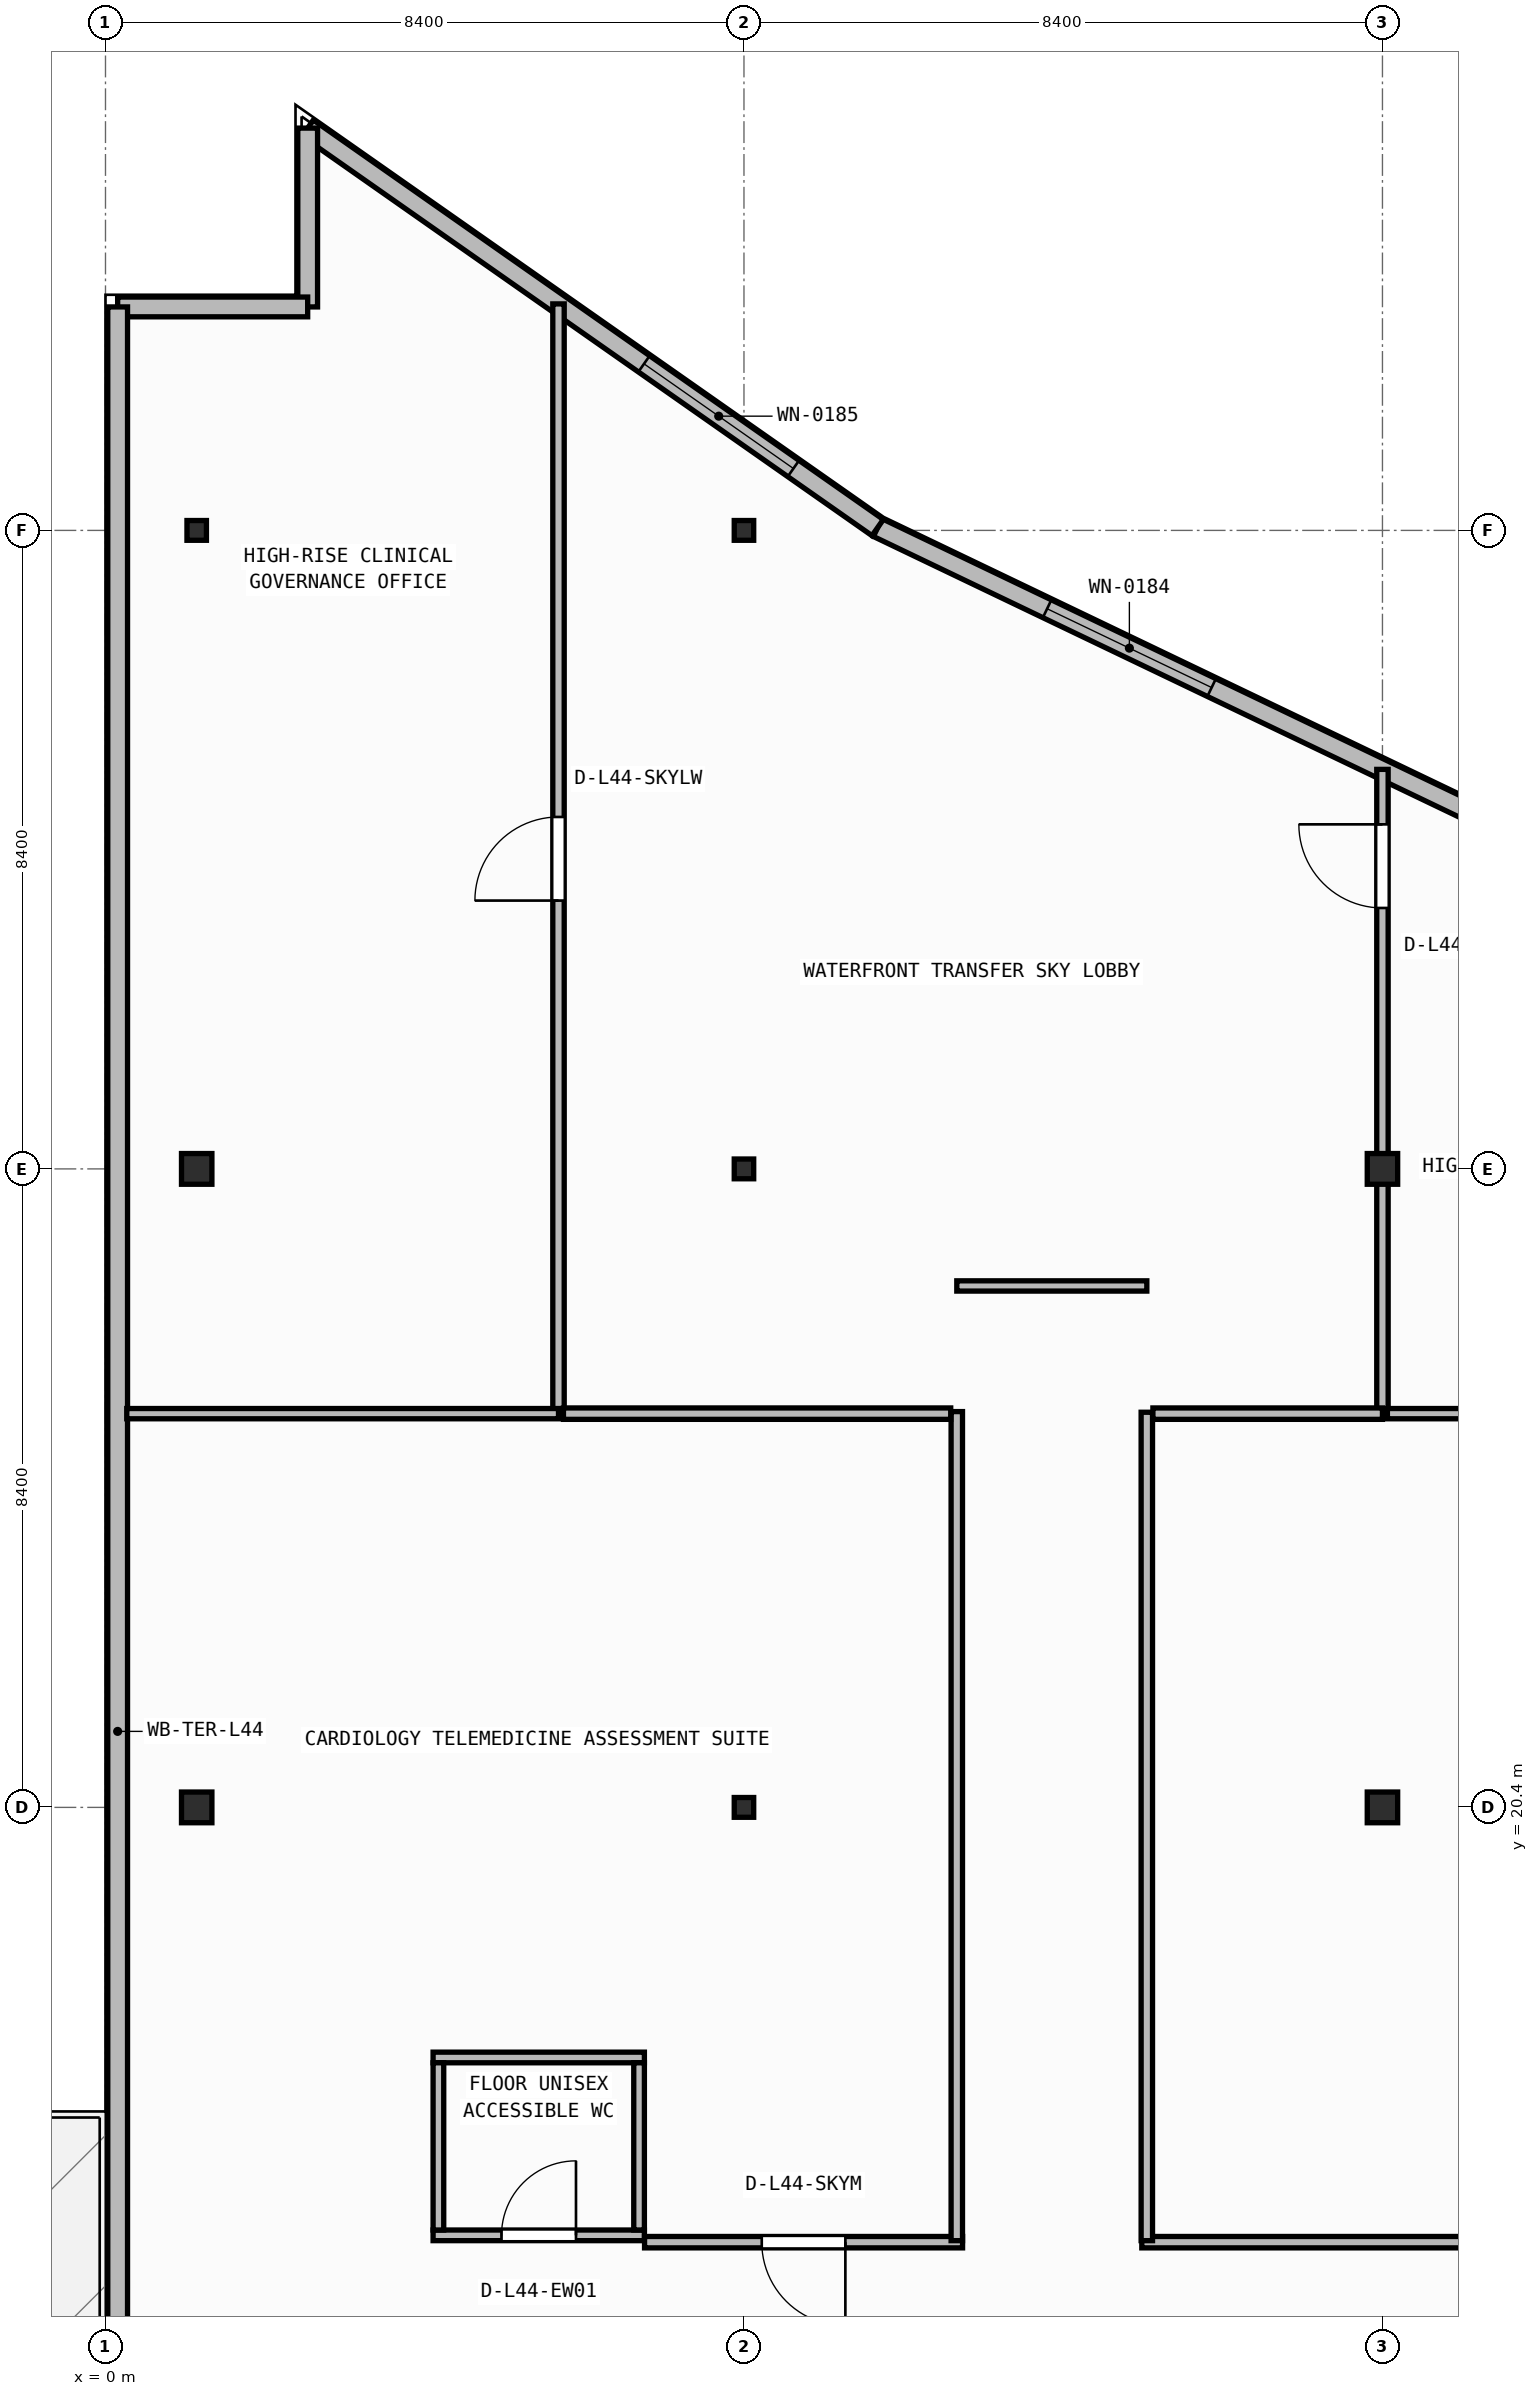
"""IFC4 building model, lengths in metres.
Left out: names, types, materials, properties, quantities, classifications, styles, units other than length and angle.
Written with IfcOpenShell. Run it as: python <this file> out.ifc"""

import sys

from ifc_helpers import new_model, si_unit, direction, frame, frame_2d, origin, origin_2d, place, context, subcontext, project, spatial, rectangle, i_section, extrude, element, fill, save


model = new_model("IFC4")
c1 = context("Model", 3, precision=1e-05, world=origin(), true_north=direction((0.0, 1.0)))
c2 = subcontext(c1, "Body", "Model", "MODEL_VIEW")
j1 = project(units=[si_unit("LENGTHUNIT", "METRE"), si_unit("PLANEANGLEUNIT", "RADIAN")], contexts=[c1])
p1 = place(None, origin())
s1 = spatial("IfcSite", under=j1, at=p1, CompositionType="ELEMENT")
p2 = place(p1, origin())
s2 = spatial("IfcBuilding", under=s1, at=p2, CompositionType="ELEMENT")
p3 = place(p2, frame((0.0, 0.0, 180.25)))
s3 = spatial("IfcBuildingStorey", under=s2, at=p3, CompositionType="ELEMENT", Elevation=180.25)
p4 = place(p3, frame((1.2, 20.4, 0.0), z_axis=(0.0, 0.0, 1.0), x_axis=(1.0, 0.0, 0.0)))
e1 = element("IfcColumn", 1, at=p4, inside=s3, PredefinedType="COLUMN", context=c2, shape_type="SweptSolid", body=[
    extrude(i_section(OverallWidth=0.4, OverallDepth=0.404, WebThickness=0.02, FlangeThickness=0.032, at=origin_2d()), origin(), (0.0, 0.0, 1.0), 3.95),
])
p5 = place(p3, frame((8.4, 20.4, 0.0), z_axis=(0.0, 0.0, 1.0), x_axis=(1.0, 0.0, 0.0)))
e2 = element("IfcColumn", 2, at=p5, inside=s3, PredefinedType="COLUMN", context=c2, shape_type="SweptSolid", body=[
    extrude(i_section(OverallWidth=0.256, OverallDepth=0.26, WebThickness=0.01, FlangeThickness=0.017, FilletRadius=0.013, at=origin_2d()), origin(), (0.0, 0.0, 1.0), 3.95),
])
for number, where, z_axis, x_axis in (
    (3, (16.8, 20.4, 0.0), (0.0, 0.0, 1.0), (1.0, 0.0, 0.0)),
    (4, (1.2, 28.8, 0.0), (0.0, 0.0, 1.0), (1.0, 0.0, 0.0)),
):
    element("IfcColumn", number, at=place(p3, frame(where, z_axis=z_axis, x_axis=x_axis)), inside=s3, PredefinedType="COLUMN", context=c2, shape_type="SweptSolid", body=[
        extrude(i_section(OverallWidth=0.4, OverallDepth=0.404, WebThickness=0.02, FlangeThickness=0.032, at=origin_2d()), origin(), (0.0, 0.0, 1.0), 3.95),
    ])
p6 = place(p3, frame((8.4, 28.8, 0.0), z_axis=(0.0, 0.0, 1.0), x_axis=(1.0, 0.0, 0.0)))
e5 = element("IfcColumn", 5, at=p6, inside=s3, PredefinedType="COLUMN", context=c2, shape_type="SweptSolid", body=[
    extrude(i_section(OverallWidth=0.256, OverallDepth=0.26, WebThickness=0.01, FlangeThickness=0.017, FilletRadius=0.013, at=origin_2d()), origin(), (0.0, 0.0, 1.0), 3.95),
])
p7 = place(p3, frame((16.8, 28.8, 0.0), z_axis=(0.0, 0.0, 1.0), x_axis=(1.0, 0.0, 0.0)))
e6 = element("IfcColumn", 6, at=p7, inside=s3, PredefinedType="COLUMN", context=c2, shape_type="SweptSolid", body=[
    extrude(i_section(OverallWidth=0.4, OverallDepth=0.404, WebThickness=0.02, FlangeThickness=0.032, at=origin_2d()), origin(), (0.0, 0.0, 1.0), 3.95),
])
for number, where, z_axis, x_axis in (
    (7, (1.2, 37.2, 0.0), (0.0, 0.0, 1.0), (1.0, 0.0, 0.0)),
    (8, (8.4, 37.2, 0.0), (0.0, 0.0, 1.0), (1.0, 0.0, 0.0)),
):
    element("IfcColumn", number, at=place(p3, frame(where, z_axis=z_axis, x_axis=x_axis)), inside=s3, PredefinedType="COLUMN", context=c2, shape_type="SweptSolid", body=[
        extrude(i_section(OverallWidth=0.256, OverallDepth=0.26, WebThickness=0.01, FlangeThickness=0.017, FilletRadius=0.013, at=origin_2d()), origin(), (0.0, 0.0, 1.0), 3.95),
    ])
p8 = place(p3, frame((21.461, 31.823, 0.0), z_axis=(0.0, 0.0, 1.0), x_axis=(-0.901858094827, 0.432032379336, 0.0)))
e9 = element("IfcWall", 9, at=p8, inside=s3, PredefinedType="STANDARD", context=c2, shape_type="SweptSolid", body=[
    extrude(rectangle(XDim=12.532, YDim=0.26, at=frame_2d((6.266, 0.0))), origin(), (0.0, 0.0, 1.0), 3.71),
])
p9 = place(p8, frame((7.66, 0.0, 0.9)))
e10 = element("IfcOpeningElement", 10, at=p9, cuts=e9, PredefinedType="OPENING", context=c2, shape_type="SweptSolid", body=[
    extrude(rectangle(XDim=2.4, YDim=1.65, at=frame_2d((1.2, 0.825))), frame((0.0, 0.14, 0.0), z_axis=(0.0, -1.0, 0.0), x_axis=(1.0, 0.0, 0.0)), (0.0, 0.0, 1.0), 0.28),
])
p10 = place(p3, frame((10.159, 37.237, 0.0), z_axis=(0.0, 0.0, 1.0), x_axis=(-0.818933702389, 0.57388813465, 0.0)))
e11 = element("IfcWall", 11, at=p10, inside=s3, PredefinedType="STANDARD", context=c2, shape_type="SweptSolid", body=[
    extrude(rectangle(XDim=9.157, YDim=0.26, at=frame_2d((4.579, 0.0))), origin(), (0.0, 0.0, 1.0), 3.71),
])
p11 = place(p10, frame((1.354, 0.0, 0.9)))
e12 = element("IfcOpeningElement", 12, at=p11, cuts=e11, PredefinedType="OPENING", context=c2, shape_type="SweptSolid", body=[
    extrude(rectangle(XDim=2.4, YDim=1.65, at=frame_2d((1.2, 0.825))), frame((0.0, 0.14, 0.0), z_axis=(0.0, -1.0, 0.0), x_axis=(1.0, 0.0, 0.0)), (0.0, 0.0, 1.0), 0.28),
])
p12 = place(p3, frame((2.66, 42.492, 0.0), z_axis=(0.0, 0.0, 1.0), x_axis=(0.0, -1.0, 0.0)))
e13 = element("IfcWall", 13, at=p12, inside=s3, PredefinedType="STANDARD", context=c2, shape_type="SweptSolid", body=[
    extrude(rectangle(XDim=2.353, YDim=0.26, at=frame_2d((1.176, 0.0))), origin(), (0.0, 0.0, 1.0), 3.71),
])
p13 = place(p3, frame((2.66, 40.14, 0.0), z_axis=(0.0, 0.0, 1.0), x_axis=(-1.0, 0.0, 0.0)))
e14 = element("IfcWall", 14, at=p13, inside=s3, PredefinedType="STANDARD", context=c2, shape_type="SweptSolid", body=[
    extrude(rectangle(XDim=2.5, YDim=0.26, at=frame_2d((1.25, 0.0))), origin(), (0.0, 0.0, 1.0), 3.71),
])
p14 = place(p3, frame((0.16, 40.14, 0.0), z_axis=(0.0, 0.0, 1.0), x_axis=(0.0, -1.0, 0.0)))
e15 = element("IfcWall", 15, at=p14, inside=s3, PredefinedType="STANDARD", context=c2, shape_type="SweptSolid", body=[
    extrude(rectangle(XDim=37.48, YDim=0.26, at=frame_2d((18.74, 0.0))), origin(), (0.0, 0.0, 1.0), 3.71),
])
p15 = place(p14, frame((29.542, 0.0, 0.0)))
e16 = element("IfcOpeningElement", 16, at=p15, cuts=e15, PredefinedType="OPENING", context=c2, shape_type="SweptSolid", body=[
    extrude(rectangle(XDim=1.3, YDim=2.15, at=frame_2d((0.65, 1.075))), frame((0.0, 0.14, 0.0), z_axis=(0.0, -1.0, 0.0), x_axis=(1.0, 0.0, 0.0)), (0.0, 0.0, 1.0), 0.28),
])
p16 = place(p3, frame((4.31, 14.77, 0.0), z_axis=(0.0, 0.0, 1.0), x_axis=(1.0, 0.0, 0.0)))
e17 = element("IfcWall", 17, at=p16, inside=s3, PredefinedType="PARTITIONING", context=c2, shape_type="SweptSolid", body=[
    extrude(rectangle(XDim=2.78, YDim=0.14, at=frame_2d((1.39, 0.0))), origin(), (0.0, 0.0, 1.0), 3.71),
])
p17 = place(p16, frame((0.9, 0.0, 0.0)))
e18 = element("IfcOpeningElement", 18, at=p17, cuts=e17, PredefinedType="OPENING", context=c2, shape_type="SweptSolid", body=[
    extrude(rectangle(XDim=0.98, YDim=2.1, at=frame_2d((0.49, 1.05))), frame((0.0, 0.08, 0.0), z_axis=(0.0, -1.0, 0.0), x_axis=(1.0, 0.0, 0.0)), (0.0, 0.0, 1.0), 0.16),
])
p18 = place(p3, frame((4.31, 17.11, 0.0), z_axis=(0.0, 0.0, 1.0), x_axis=(1.0, 0.0, 0.0)))
e19 = element("IfcWall", 19, at=p18, inside=s3, PredefinedType="PARTITIONING", context=c2, shape_type="SweptSolid", body=[
    extrude(rectangle(XDim=2.78, YDim=0.14, at=frame_2d((1.39, 0.0))), origin(), (0.0, 0.0, 1.0), 3.71),
])
for number, where, z_axis, x_axis in (
    (20, (4.38, 14.84, 0.0), (0.0, 0.0, 1.0), (0.0, 1.0, 0.0)),
    (21, (7.02, 14.84, 0.0), (0.0, 0.0, 1.0), (0.0, 1.0, 0.0)),
):
    element("IfcWall", number, at=place(p3, frame(where, z_axis=z_axis, x_axis=x_axis)), inside=s3, PredefinedType="PARTITIONING", context=c2, shape_type="SweptSolid", body=[
        extrude(rectangle(XDim=2.2, YDim=0.14, at=frame_2d((1.1, 0.0))), origin(), (0.0, 0.0, 1.0), 3.71),
    ])
p19 = place(p3, frame((11.276, 14.68, 0.0), z_axis=(0.0, 0.0, 1.0), x_axis=(-1.0, 0.0, 0.0)))
e22 = element("IfcWall", 22, at=p19, inside=s3, PredefinedType="PARTITIONING", context=c2, shape_type="SweptSolid", body=[
    extrude(rectangle(XDim=4.184, YDim=0.15, at=frame_2d((2.092, 0.0))), origin(), (0.0, 0.0, 1.0), 3.71),
])
p20 = place(p19, frame((1.542, 0.0, 0.0)))
e23 = element("IfcOpeningElement", 23, at=p20, cuts=e22, PredefinedType="OPENING", context=c2, shape_type="SweptSolid", body=[
    extrude(rectangle(XDim=1.1, YDim=2.1, at=frame_2d((0.55, 1.05))), frame((0.0, 0.085, 0.0), z_axis=(0.0, -1.0, 0.0), x_axis=(1.0, 0.0, 0.0)), (0.0, 0.0, 1.0), 0.17),
])
p21 = place(p3, frame((51.04, 14.68, 0.0), z_axis=(0.0, 0.0, 1.0), x_axis=(-1.0, 0.0, 0.0)))
e24 = element("IfcWall", 24, at=p21, inside=s3, PredefinedType="PARTITIONING", context=c2, shape_type="SweptSolid", body=[
    extrude(rectangle(XDim=37.406, YDim=0.15, at=frame_2d((18.703, 0.0))), origin(), (0.0, 0.0, 1.0), 3.71),
])
p22 = place(p21, frame((18.153, 0.0, 0.0)))
e25 = element("IfcOpeningElement", 25, at=p22, cuts=e24, PredefinedType="OPENING", context=c2, shape_type="SweptSolid", body=[
    extrude(rectangle(XDim=1.1, YDim=2.1, at=frame_2d((0.55, 1.05))), frame((0.0, 0.085, 0.0), z_axis=(0.0, -1.0, 0.0), x_axis=(1.0, 0.0, 0.0)), (0.0, 0.0, 1.0), 0.17),
])
p23 = place(p3, frame((13.7, 27.26, 0.0), z_axis=(0.0, 0.0, 1.0), x_axis=(-1.0, 0.0, 0.0)))
e26 = element("IfcWall", 26, at=p23, inside=s3, PredefinedType="PARTITIONING", context=c2, shape_type="SweptSolid", body=[
    extrude(rectangle(XDim=2.5, YDim=0.135, at=frame_2d((1.25, 0.0))), origin(), (0.0, 0.0, 1.0), 3.71),
])
p24 = place(p3, frame((11.2, 25.607, 0.0), z_axis=(0.0, 0.0, 1.0), x_axis=(0.0, -1.0, 0.0)))
e27 = element("IfcWall", 27, at=p24, inside=s3, PredefinedType="PARTITIONING", context=c2, shape_type="SweptSolid", body=[
    extrude(rectangle(XDim=10.907, YDim=0.15, at=frame_2d((5.454, 0.0))), origin(), (0.0, 0.0, 1.0), 3.71),
])
p25 = place(p3, frame((13.7, 14.7, 0.0), z_axis=(0.0, 0.0, 1.0), x_axis=(0.0, 1.0, 0.0)))
e28 = element("IfcWall", 28, at=p25, inside=s3, PredefinedType="PARTITIONING", context=c2, shape_type="SweptSolid", body=[
    extrude(rectangle(XDim=10.898, YDim=0.15, at=frame_2d((5.449, 0.0))), origin(), (0.0, 0.0, 1.0), 3.71),
])
p26 = place(p3, frame((5.96, 25.58, 0.0), z_axis=(0.0, 0.0, 1.0), x_axis=(0.0, 1.0, 0.0)))
e29 = element("IfcWall", 29, at=p26, inside=s3, PredefinedType="PARTITIONING", context=c2, shape_type="SweptSolid", body=[
    extrude(rectangle(XDim=14.6, YDim=0.15, at=frame_2d((7.3, 0.0))), origin(), (0.0, 0.0, 1.0), 3.71),
])
p27 = place(p26, frame((6.75, 0.0, 0.0)))
e30 = element("IfcOpeningElement", 30, at=p27, cuts=e29, PredefinedType="OPENING", context=c2, shape_type="SweptSolid", body=[
    extrude(rectangle(XDim=1.1, YDim=2.1, at=frame_2d((0.55, 1.05))), frame((0.0, 0.085, 0.0), z_axis=(0.0, -1.0, 0.0), x_axis=(1.0, 0.0, 0.0)), (0.0, 0.0, 1.0), 0.17),
])
p28 = place(p3, frame((0.28, 25.58, 0.0), z_axis=(0.0, 0.0, 1.0), x_axis=(1.0, 0.0, 0.0)))
e31 = element("IfcWall", 31, at=p28, inside=s3, PredefinedType="PARTITIONING", context=c2, shape_type="SweptSolid", body=[
    extrude(rectangle(XDim=5.68, YDim=0.135, at=frame_2d((2.84, 0.0))), origin(), (0.0, 0.0, 1.0), 3.71),
])
p29 = place(p3, frame((16.8, 25.58, 0.0), z_axis=(0.0, 0.0, 1.0), x_axis=(0.0, 1.0, 0.0)))
e32 = element("IfcWall", 32, at=p29, inside=s3, PredefinedType="PARTITIONING", context=c2, shape_type="SweptSolid", body=[
    extrude(rectangle(XDim=8.476, YDim=0.15, at=frame_2d((4.238, 0.0))), origin(), (0.0, 0.0, 1.0), 3.152),
])
p30 = place(p29, frame((6.653, 0.0, 0.0)))
e33 = element("IfcOpeningElement", 33, at=p30, cuts=e32, PredefinedType="OPENING", context=c2, shape_type="SweptSolid", body=[
    extrude(rectangle(XDim=1.1, YDim=2.1, at=frame_2d((0.55, 1.05))), frame((0.0, 0.085, 0.0), z_axis=(0.0, -1.0, 0.0), x_axis=(1.0, 0.0, 0.0)), (0.0, 0.0, 1.0), 0.17),
])
p31 = place(p3, frame((6.025, 25.58, 0.0), z_axis=(0.0, 0.0, 1.0), x_axis=(1.0, 0.0, 0.0)))
e34 = element("IfcWall", 34, at=p31, inside=s3, PredefinedType="PARTITIONING", context=c2, shape_type="SweptSolid", body=[
    extrude(rectangle(XDim=5.095, YDim=0.15, at=frame_2d((2.548, 0.0))), origin(), (0.0, 0.0, 1.0), 3.71),
])
p32 = place(p3, frame((13.78, 25.58, 0.0), z_axis=(0.0, 0.0, 1.0), x_axis=(1.0, 0.0, 0.0)))
e35 = element("IfcWall", 35, at=p32, inside=s3, PredefinedType="PARTITIONING", context=c2, shape_type="SweptSolid", body=[
    extrude(rectangle(XDim=3.02, YDim=0.15, at=frame_2d((1.51, 0.0))), origin(), (0.0, 0.0, 1.0), 3.71),
])
p33 = place(p3, frame((16.865, 25.58, 0.0), z_axis=(0.0, 0.0, 1.0), x_axis=(1.0, 0.0, 0.0)))
e36 = element("IfcWall", 36, at=p33, inside=s3, PredefinedType="PARTITIONING", context=c2, shape_type="SweptSolid", body=[
    extrude(rectangle(XDim=34.175, YDim=0.135, at=frame_2d((17.087, 0.0))), origin(), (0.0, 0.0, 1.0), 3.71),
])
p34 = place(p9, origin())
e37 = element("IfcWindow", 37, at=p34, inside=s3, PartitioningType="SINGLE_PANEL", PredefinedType="WINDOW", context=c2, shape_type="SweptSolid", body=[
    extrude(rectangle(XDim=2.4, YDim=1.65, at=frame_2d((1.2, 0.825))), frame((0.0, 0.03, 0.0), z_axis=(0.0, -1.0, 0.0), x_axis=(1.0, 0.0, 0.0)), (0.0, 0.0, 1.0), 0.06),
])
fill(e10, e37)
p35 = place(p11, origin())
e38 = element("IfcWindow", 38, at=p35, inside=s3, PartitioningType="SINGLE_PANEL", PredefinedType="WINDOW", context=c2, shape_type="SweptSolid", body=[
    extrude(rectangle(XDim=2.4, YDim=1.65, at=frame_2d((1.2, 0.825))), frame((0.0, 0.03, 0.0), z_axis=(0.0, -1.0, 0.0), x_axis=(1.0, 0.0, 0.0)), (0.0, 0.0, 1.0), 0.06),
])
fill(e12, e38)
p36 = place(p17, origin())
e39 = element("IfcDoor", 39, at=p36, inside=s3, OperationType="SINGLE_SWING_RIGHT", PredefinedType="DOOR", context=c2, shape_type="SweptSolid", body=[
    extrude(rectangle(XDim=0.98, YDim=2.1, at=frame_2d((0.49, 1.05))), frame((0.0, 0.025, 0.0), z_axis=(0.0, -1.0, 0.0), x_axis=(1.0, 0.0, 0.0)), (0.0, 0.0, 1.0), 0.05),
])
fill(e18, e39)
p37 = place(p20, origin())
e40 = element("IfcDoor", 40, at=p37, inside=s3, OperationType="SINGLE_SWING_LEFT", PredefinedType="DOOR", context=c2, shape_type="SweptSolid", body=[
    extrude(rectangle(XDim=1.1, YDim=2.1, at=frame_2d((0.55, 1.05))), frame((0.0, 0.025, 0.0), z_axis=(0.0, -1.0, 0.0), x_axis=(1.0, 0.0, 0.0)), (0.0, 0.0, 1.0), 0.05),
])
fill(e23, e40)
p38 = place(p27, origin())
e41 = element("IfcDoor", 41, at=p38, inside=s3, OperationType="SINGLE_SWING_LEFT", PredefinedType="DOOR", context=c2, shape_type="SweptSolid", body=[
    extrude(rectangle(XDim=1.1, YDim=2.1, at=frame_2d((0.55, 1.05))), frame((0.0, 0.025, 0.0), z_axis=(0.0, -1.0, 0.0), x_axis=(1.0, 0.0, 0.0)), (0.0, 0.0, 1.0), 0.05),
])
fill(e30, e41)
p39 = place(p30, origin())
e42 = element("IfcDoor", 42, at=p39, inside=s3, OperationType="SINGLE_SWING_RIGHT", PredefinedType="DOOR", context=c2, shape_type="SweptSolid", body=[
    extrude(rectangle(XDim=1.1, YDim=2.1, at=frame_2d((0.55, 1.05))), frame((0.0, 0.025, 0.0), z_axis=(0.0, -1.0, 0.0), x_axis=(1.0, 0.0, 0.0)), (0.0, 0.0, 1.0), 0.05),
])
fill(e33, e42)
save(model, sys.argv[1])
